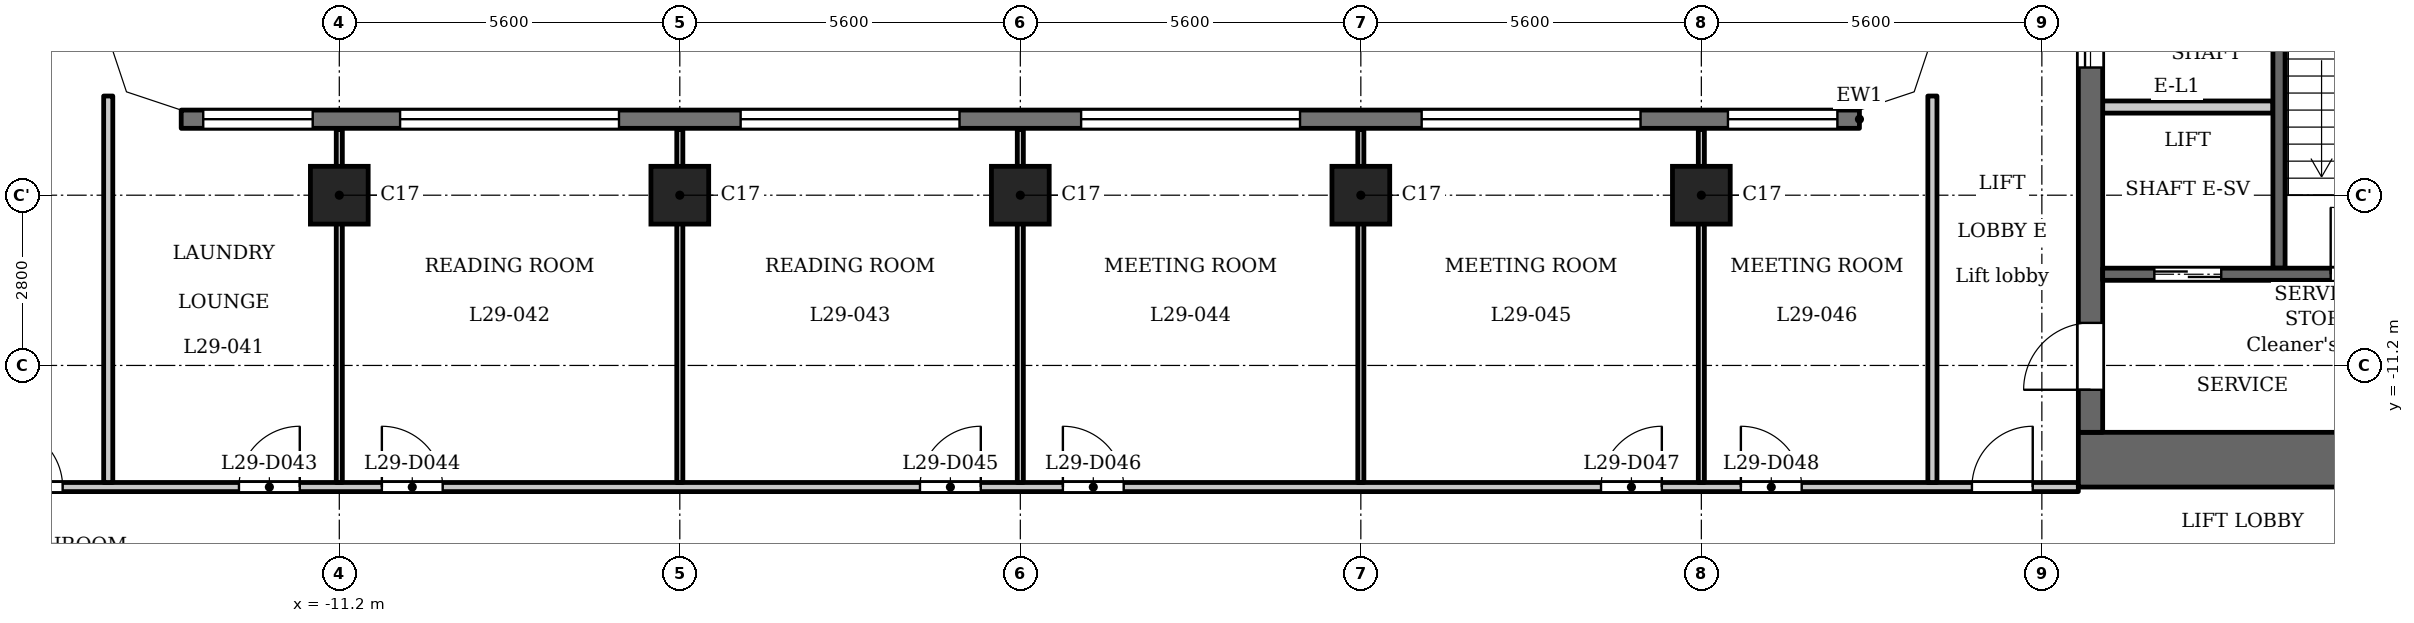
"""IFC4 building model, lengths in metres.
Left out: names, types, materials, properties, quantities, classifications, styles, units other than length and angle.
Written with IfcOpenShell. Run it as: python <this file> out.ifc"""

import sys

from ifc_helpers import new_model, si_unit, direction, frame, frame_2d, origin, origin_2d, place, context, subcontext, project, spatial, polyline, rectangle, outline, extrude, element, fill, save


model = new_model("IFC4")
c1 = context("Model", 3, precision=1e-05, world=origin(), true_north=direction((0.0, 1.0)))
c2 = subcontext(c1, "Body", "Model", "MODEL_VIEW")
j1 = project(units=[si_unit("LENGTHUNIT", "METRE"), si_unit("PLANEANGLEUNIT", "RADIAN")], contexts=[c1])
p1 = place(None, origin())
s1 = spatial("IfcSite", under=j1, at=p1, CompositionType="ELEMENT")
p2 = place(p1, origin())
s2 = spatial("IfcBuilding", under=s1, at=p2, CompositionType="ELEMENT")
p3 = place(p2, frame((0.0, 0.0, 114.8)))
s3 = spatial("IfcBuildingStorey", under=s2, at=p3, CompositionType="ELEMENT", Elevation=114.8)
for number, where, z_axis, x_axis in (
    (1, (-11.2, -8.4, 0.0), (0.0, 0.0, 1.0), (1.0, 0.0, 0.0)),
    (2, (-5.6, -8.4, 0.0), (0.0, 0.0, 1.0), (1.0, 0.0, 0.0)),
    (3, (0.0, -8.4, 0.0), (0.0, 0.0, 1.0), (1.0, 0.0, 0.0)),
    (4, (5.6, -8.4, 0.0), (0.0, 0.0, 1.0), (1.0, 0.0, 0.0)),
    (5, (11.2, -8.4, 0.0), (0.0, 0.0, 1.0), (1.0, 0.0, 0.0)),
):
    element("IfcColumn", number, at=place(p3, frame(where, z_axis=z_axis, x_axis=x_axis)), inside=s3, PredefinedType="COLUMN", context=c2, shape_type="SweptSolid", body=[
        extrude(rectangle(XDim=0.95, YDim=0.95, at=origin_2d()), origin(), (0.0, 0.0, 1.0), 3.5),
    ])
p4 = place(p3, frame((13.8, -7.15, 0.0), z_axis=(0.0, 0.0, 1.0), x_axis=(-1.0, 0.0, 0.0)))
e6 = element("IfcWall", 6, at=p4, inside=s3, PredefinedType="SOLIDWALL", context=c2, shape_type="SweptSolid", body=[
    extrude(rectangle(XDim=27.6, YDim=0.3, at=frame_2d((13.8, 0.0))), origin(), (0.0, 0.0, 1.0), 3.2),
])
p5 = place(p4, frame((0.363, 0.0, 0.9)))
e7 = element("IfcOpeningElement", 7, at=p5, cuts=e6, PredefinedType="OPENING", context=c2, shape_type="SweptSolid", body=[
    extrude(rectangle(XDim=1.8, YDim=1.25, at=frame_2d((0.9, 0.625))), frame((0.0, 0.16, 0.0), z_axis=(0.0, -1.0, 0.0), x_axis=(1.0, 0.0, 0.0)), (0.0, 0.0, 1.0), 0.32),
])
p6 = place(p4, frame((3.6, 0.0, 1.2)))
e8 = element("IfcOpeningElement", 8, at=p6, cuts=e6, PredefinedType="OPENING", context=c2, shape_type="SweptSolid", body=[
    extrude(rectangle(XDim=3.6, YDim=0.95, at=frame_2d((1.8, 0.475))), frame((0.0, 0.16, 0.0), z_axis=(0.0, -1.0, 0.0), x_axis=(1.0, 0.0, 0.0)), (0.0, 0.0, 1.0), 0.32),
])
p7 = place(p4, frame((9.2, 0.0, 1.2)))
e9 = element("IfcOpeningElement", 9, at=p7, cuts=e6, PredefinedType="OPENING", context=c2, shape_type="SweptSolid", body=[
    extrude(rectangle(XDim=3.6, YDim=0.95, at=frame_2d((1.8, 0.475))), frame((0.0, 0.16, 0.0), z_axis=(0.0, -1.0, 0.0), x_axis=(1.0, 0.0, 0.0)), (0.0, 0.0, 1.0), 0.32),
])
p8 = place(p4, frame((14.8, 0.0, 1.2)))
e10 = element("IfcOpeningElement", 10, at=p8, cuts=e6, PredefinedType="OPENING", context=c2, shape_type="SweptSolid", body=[
    extrude(rectangle(XDim=3.6, YDim=0.95, at=frame_2d((1.8, 0.475))), frame((0.0, 0.16, 0.0), z_axis=(0.0, -1.0, 0.0), x_axis=(1.0, 0.0, 0.0)), (0.0, 0.0, 1.0), 0.32),
])
p9 = place(p4, frame((20.4, 0.0, 1.2)))
e11 = element("IfcOpeningElement", 11, at=p9, cuts=e6, PredefinedType="OPENING", context=c2, shape_type="SweptSolid", body=[
    extrude(rectangle(XDim=3.6, YDim=0.95, at=frame_2d((1.8, 0.475))), frame((0.0, 0.16, 0.0), z_axis=(0.0, -1.0, 0.0), x_axis=(1.0, 0.0, 0.0)), (0.0, 0.0, 1.0), 0.32),
])
p10 = place(p4, frame((25.438, 0.0, 0.9)))
e12 = element("IfcOpeningElement", 12, at=p10, cuts=e6, PredefinedType="OPENING", context=c2, shape_type="SweptSolid", body=[
    extrude(rectangle(XDim=1.8, YDim=1.25, at=frame_2d((0.9, 0.625))), frame((0.0, 0.16, 0.0), z_axis=(0.0, -1.0, 0.0), x_axis=(1.0, 0.0, 0.0)), (0.0, 0.0, 1.0), 0.32),
])
p11 = place(p3, frame((20.7, -9.6, 0.0), z_axis=(0.0, 0.0, 1.0), x_axis=(0.0, 1.0, 0.0)))
e13 = element("IfcWall", 13, at=p11, inside=s3, PredefinedType="SHEAR", context=c2, shape_type="SweptSolid", body=[
    extrude(rectangle(XDim=9.75, YDim=0.2, at=frame_2d((4.875, 0.0))), origin(), (0.0, 0.0, 1.0), 3.2),
])
p12 = place(p3, frame((17.4, -12.75, 0.0), z_axis=(0.0, 0.0, 1.0), x_axis=(1.0, 0.0, 0.0)))
e14 = element("IfcWall", 14, at=p12, inside=s3, PredefinedType="SHEAR", context=c2, shape_type="SweptSolid", body=[
    extrude(rectangle(XDim=10.4, YDim=0.9, at=frame_2d((5.2, 0.0))), origin(), (0.0, 0.0, 1.0), 3.2),
])
p13 = place(p3, frame((17.6, -12.3, 0.0), z_axis=(0.0, 0.0, 1.0), x_axis=(0.0, 1.0, 0.0)))
e15 = element("IfcWall", 15, at=p13, inside=s3, PredefinedType="SHEAR", context=c2, shape_type="SweptSolid", body=[
    extrude(rectangle(XDim=24.6, YDim=0.4, at=frame_2d((12.3, 0.0))), origin(), (0.0, 0.0, 1.0), 3.2),
])
p14 = place(p13, frame((6.0, 0.0, 0.0)))
e16 = element("IfcOpeningElement", 16, at=p14, cuts=e15, PredefinedType="OPENING", context=c2, shape_type="SweptSolid", body=[
    extrude(rectangle(XDim=1.1, YDim=2.1, at=frame_2d((0.55, 1.05))), frame((0.0, 0.21, 0.0), z_axis=(0.0, -1.0, 0.0), x_axis=(1.0, 0.0, 0.0)), (0.0, 0.0, 1.0), 0.42),
])
p15 = place(p13, frame((8.4, 0.0, 0.0)))
e17 = element("IfcOpeningElement", 17, at=p15, cuts=e15, PredefinedType="OPENING", context=c2, shape_type="SweptSolid", body=[
    extrude(rectangle(XDim=1.1, YDim=2.1, at=frame_2d((0.55, 1.05))), frame((0.0, 0.21, 0.0), z_axis=(0.0, -1.0, 0.0), x_axis=(1.0, 0.0, 0.0)), (0.0, 0.0, 1.0), 0.42),
])
p16 = place(p13, frame((10.8, 0.0, 0.0)))
e18 = element("IfcOpeningElement", 18, at=p16, cuts=e15, PredefinedType="OPENING", context=c2, shape_type="SweptSolid", body=[
    extrude(rectangle(XDim=1.1, YDim=2.1, at=frame_2d((0.55, 1.05))), frame((0.0, 0.21, 0.0), z_axis=(0.0, -1.0, 0.0), x_axis=(1.0, 0.0, 0.0)), (0.0, 0.0, 1.0), 0.42),
])
p17 = place(p13, frame((16.75, 0.0, 0.0)))
e19 = element("IfcOpeningElement", 19, at=p17, cuts=e15, PredefinedType="OPENING", context=c2, shape_type="SweptSolid", body=[
    extrude(rectangle(XDim=0.9, YDim=2.1, at=frame_2d((0.45, 1.05))), frame((0.0, 0.21, 0.0), z_axis=(0.0, -1.0, 0.0), x_axis=(1.0, 0.0, 0.0)), (0.0, 0.0, 1.0), 0.42),
])
p18 = place(p13, frame((22.8, 0.0, 0.0)))
e20 = element("IfcOpeningElement", 20, at=p18, cuts=e15, PredefinedType="OPENING", context=c2, shape_type="SweptSolid", body=[
    extrude(rectangle(XDim=1.1, YDim=2.1, at=frame_2d((0.55, 1.05))), frame((0.0, 0.21, 0.0), z_axis=(0.0, -1.0, 0.0), x_axis=(1.0, 0.0, 0.0)), (0.0, 0.0, 1.0), 0.42),
])
p19 = place(p13, frame((0.7, 0.0, 0.0)))
e21 = element("IfcOpeningElement", 21, at=p19, cuts=e15, PredefinedType="OPENING", context=c2, shape_type="SweptSolid", body=[
    extrude(rectangle(XDim=1.1, YDim=2.1, at=frame_2d((0.55, 1.05))), frame((0.0, 0.21, 0.0), z_axis=(0.0, -1.0, 0.0), x_axis=(1.0, 0.0, 0.0)), (0.0, 0.0, 1.0), 0.42),
])
p20 = place(p13, frame((12.775, 0.0, 0.0)))
e22 = element("IfcOpeningElement", 22, at=p20, cuts=e15, PredefinedType="OPENING", context=c2, shape_type="SweptSolid", body=[
    extrude(rectangle(XDim=1.8, YDim=2.1, at=frame_2d((0.9, 1.05))), frame((0.0, 0.21, 0.0), z_axis=(0.0, -1.0, 0.0), x_axis=(1.0, 0.0, 0.0)), (0.0, 0.0, 1.0), 0.42),
])
p21 = place(p3, frame((17.8, -9.7, 0.0), z_axis=(0.0, 0.0, 1.0), x_axis=(1.0, 0.0, 0.0)))
e23 = element("IfcWall", 23, at=p21, inside=s3, PredefinedType="SHEAR", context=c2, shape_type="SweptSolid", body=[
    extrude(rectangle(XDim=8.3, YDim=0.2, at=frame_2d((4.15, 0.0))), origin(), (0.0, 0.0, 1.0), 3.2),
])
p22 = place(p21, frame((0.85, 0.0, 0.0)))
e24 = element("IfcOpeningElement", 24, at=p22, cuts=e23, PredefinedType="OPENING", context=c2, shape_type="SweptSolid", body=[
    extrude(rectangle(XDim=1.1, YDim=2.1, at=frame_2d((0.55, 1.05))), frame((0.0, 0.11, 0.0), z_axis=(0.0, -1.0, 0.0), x_axis=(1.0, 0.0, 0.0)), (0.0, 0.0, 1.0), 0.22),
])
p23 = place(p21, frame((3.75, 0.0, 0.0)))
e25 = element("IfcOpeningElement", 25, at=p23, cuts=e23, PredefinedType="OPENING", context=c2, shape_type="SweptSolid", body=[
    extrude(rectangle(XDim=1.1, YDim=2.1, at=frame_2d((0.55, 1.05))), frame((0.0, 0.11, 0.0), z_axis=(0.0, -1.0, 0.0), x_axis=(1.0, 0.0, 0.0)), (0.0, 0.0, 1.0), 0.22),
])
p24 = place(p3, frame((17.8, -6.95, 0.0), z_axis=(0.0, 0.0, 1.0), x_axis=(1.0, 0.0, 0.0)))
e26 = element("IfcWall", 26, at=p24, inside=s3, PredefinedType="PARTITIONING", context=c2, shape_type="SweptSolid", body=[
    extrude(rectangle(XDim=2.8, YDim=0.2, at=frame_2d((1.4, 0.0))), origin(), (0.0, 0.0, 1.0), 3.2),
])
p25 = place(p3, frame((-17.4, -13.2, 0.0), z_axis=(0.0, 0.0, 1.0), x_axis=(1.0, 0.0, 0.0)))
e27 = element("IfcWall", 27, at=p25, inside=s3, PredefinedType="PARTITIONING", context=c2, shape_type="SweptSolid", body=[
    extrude(rectangle(XDim=34.8, YDim=0.15, at=frame_2d((17.4, 0.0))), origin(), (0.0, 0.0, 1.0), 3.2),
])
p26 = place(p25, frame((0.65, 0.0, 0.0)))
e28 = element("IfcOpeningElement", 28, at=p26, cuts=e27, PredefinedType="OPENING", context=c2, shape_type="SweptSolid", body=[
    extrude(rectangle(XDim=1.0, YDim=2.1, at=frame_2d((0.5, 1.05))), frame((0.0, 0.085, 0.0), z_axis=(0.0, -1.0, 0.0), x_axis=(1.0, 0.0, 0.0)), (0.0, 0.0, 1.0), 0.17),
])
p27 = place(p25, frame((33.05, 0.0, 0.0)))
e29 = element("IfcOpeningElement", 29, at=p27, cuts=e27, PredefinedType="OPENING", context=c2, shape_type="SweptSolid", body=[
    extrude(rectangle(XDim=1.0, YDim=2.1, at=frame_2d((0.5, 1.05))), frame((0.0, 0.085, 0.0), z_axis=(0.0, -1.0, 0.0), x_axis=(1.0, 0.0, 0.0)), (0.0, 0.0, 1.0), 0.17),
])
p28 = place(p25, frame((4.55, 0.0, 0.0)))
e30 = element("IfcOpeningElement", 30, at=p28, cuts=e27, PredefinedType="OPENING", context=c2, shape_type="SweptSolid", body=[
    extrude(rectangle(XDim=1.0, YDim=2.1, at=frame_2d((0.5, 1.05))), frame((0.0, 0.085, 0.0), z_axis=(0.0, -1.0, 0.0), x_axis=(1.0, 0.0, 0.0)), (0.0, 0.0, 1.0), 0.17),
])
p29 = place(p25, frame((6.9, 0.0, 0.0)))
e31 = element("IfcOpeningElement", 31, at=p29, cuts=e27, PredefinedType="OPENING", context=c2, shape_type="SweptSolid", body=[
    extrude(rectangle(XDim=1.0, YDim=2.1, at=frame_2d((0.5, 1.05))), frame((0.0, 0.085, 0.0), z_axis=(0.0, -1.0, 0.0), x_axis=(1.0, 0.0, 0.0)), (0.0, 0.0, 1.0), 0.17),
])
p30 = place(p25, frame((15.75, 0.0, 0.0)))
e32 = element("IfcOpeningElement", 32, at=p30, cuts=e27, PredefinedType="OPENING", context=c2, shape_type="SweptSolid", body=[
    extrude(rectangle(XDim=1.0, YDim=2.1, at=frame_2d((0.5, 1.05))), frame((0.0, 0.085, 0.0), z_axis=(0.0, -1.0, 0.0), x_axis=(1.0, 0.0, 0.0)), (0.0, 0.0, 1.0), 0.17),
])
p31 = place(p25, frame((18.1, 0.0, 0.0)))
e33 = element("IfcOpeningElement", 33, at=p31, cuts=e27, PredefinedType="OPENING", context=c2, shape_type="SweptSolid", body=[
    extrude(rectangle(XDim=1.0, YDim=2.1, at=frame_2d((0.5, 1.05))), frame((0.0, 0.085, 0.0), z_axis=(0.0, -1.0, 0.0), x_axis=(1.0, 0.0, 0.0)), (0.0, 0.0, 1.0), 0.17),
])
p32 = place(p25, frame((26.95, 0.0, 0.0)))
e34 = element("IfcOpeningElement", 34, at=p32, cuts=e27, PredefinedType="OPENING", context=c2, shape_type="SweptSolid", body=[
    extrude(rectangle(XDim=1.0, YDim=2.1, at=frame_2d((0.5, 1.05))), frame((0.0, 0.085, 0.0), z_axis=(0.0, -1.0, 0.0), x_axis=(1.0, 0.0, 0.0)), (0.0, 0.0, 1.0), 0.17),
])
p33 = place(p25, frame((29.25, 0.0, 0.0)))
e35 = element("IfcOpeningElement", 35, at=p33, cuts=e27, PredefinedType="OPENING", context=c2, shape_type="SweptSolid", body=[
    extrude(rectangle(XDim=1.0, YDim=2.1, at=frame_2d((0.5, 1.05))), frame((0.0, 0.085, 0.0), z_axis=(0.0, -1.0, 0.0), x_axis=(1.0, 0.0, 0.0)), (0.0, 0.0, 1.0), 0.17),
])
p34 = place(p3, frame((-15.0, -13.125, 0.0), z_axis=(0.0, 0.0, 1.0), x_axis=(0.0, 1.0, 0.0)))
e36 = element("IfcWall", 36, at=p34, inside=s3, PredefinedType="PARTITIONING", context=c2, shape_type="SweptSolid", body=[
    extrude(rectangle(XDim=6.356, YDim=0.15, at=frame_2d((3.178, 0.0))), origin(), (0.0, 0.0, 1.0), 3.2),
])
for number, where, z_axis, x_axis in (
    (37, (-11.2, -13.125, 0.0), (0.0, 0.0, 1.0), (0.0, 1.0, 0.0)),
    (38, (-5.6, -13.125, 0.0), (0.0, 0.0, 1.0), (0.0, 1.0, 0.0)),
    (39, (0.0, -13.125, 0.0), (0.0, 0.0, 1.0), (0.0, 1.0, 0.0)),
    (40, (5.6, -13.125, 0.0), (0.0, 0.0, 1.0), (0.0, 1.0, 0.0)),
    (41, (11.2, -13.125, 0.0), (0.0, 0.0, 1.0), (0.0, 1.0, 0.0)),
):
    element("IfcWall", number, at=place(p3, frame(where, z_axis=z_axis, x_axis=x_axis)), inside=s3, PredefinedType="PARTITIONING", context=c2, shape_type="SweptSolid", body=[
        extrude(rectangle(XDim=5.805, YDim=0.1, at=frame_2d((2.902, 0.0))), origin(), (0.0, 0.0, 1.0), 3.2),
    ])
p35 = place(p3, frame((15.0, -13.125, 0.0), z_axis=(0.0, 0.0, 1.0), x_axis=(0.0, 1.0, 0.0)))
e42 = element("IfcWall", 42, at=p35, inside=s3, PredefinedType="PARTITIONING", context=c2, shape_type="SweptSolid", body=[
    extrude(rectangle(XDim=6.356, YDim=0.15, at=frame_2d((3.178, 0.0))), origin(), (0.0, 0.0, 1.0), 3.2),
])
p36 = place(p3, origin())
e43 = element("IfcWall", 43, at=p36, inside=s3, PredefinedType="SOLIDWALL", context=c2, shape_type="SweptSolid", body=[
    extrude(outline(polyline([(14.937, -6.937), (15.3, -5.849), (15.3, -5.8), (15.0, -5.8), (14.7, -6.7), (13.8, -7.0), (13.8, -7.3), (13.849, -7.3), (14.937, -6.937)])), origin(), (0.0, 0.0, 1.0), 3.2),
])
e44 = element("IfcWall", 44, at=p36, inside=s3, PredefinedType="SOLIDWALL", context=c2, shape_type="SweptSolid", body=[
    extrude(outline(polyline([(-14.937, -6.937), (-13.849, -7.3), (-13.8, -7.3), (-13.8, -7.0), (-14.7, -6.7), (-15.0, -5.8), (-15.3, -5.8), (-15.3, -5.849), (-14.937, -6.937)])), origin(), (0.0, 0.0, 1.0), 3.2),
])
p37 = place(p22, origin())
e45 = element("IfcDoor", 45, at=p37, inside=s3, OperationType="DOUBLE_DOOR_SLIDING", PredefinedType="DOOR", context=c2, shape_type="SweptSolid", body=[
    extrude(rectangle(XDim=1.1, YDim=2.1, at=frame_2d((0.55, 1.05))), frame((0.0, 0.025, 0.0), z_axis=(0.0, -1.0, 0.0), x_axis=(1.0, 0.0, 0.0)), (0.0, 0.0, 1.0), 0.05),
])
fill(e24, e45)
p38 = place(p14, origin())
e46 = element("IfcDoor", 46, at=p38, inside=s3, OperationType="DOUBLE_DOOR_SLIDING", PredefinedType="DOOR", context=c2, shape_type="SweptSolid", body=[
    extrude(rectangle(XDim=1.1, YDim=2.1, at=frame_2d((0.55, 1.05))), frame((0.0, 0.025, 0.0), z_axis=(0.0, -1.0, 0.0), x_axis=(1.0, 0.0, 0.0)), (0.0, 0.0, 1.0), 0.05),
])
fill(e16, e46)
p39 = place(p19, origin())
e47 = element("IfcDoor", 47, at=p39, inside=s3, OperationType="SINGLE_SWING_RIGHT", PredefinedType="DOOR", context=c2, shape_type="SweptSolid", body=[
    extrude(rectangle(XDim=1.1, YDim=2.1, at=frame_2d((0.55, 1.05))), frame((0.0, 0.025, 0.0), z_axis=(0.0, -1.0, 0.0), x_axis=(1.0, 0.0, 0.0)), (0.0, 0.0, 1.0), 0.05),
])
fill(e21, e47)
p40 = place(p23, origin())
e48 = element("IfcDoor", 48, at=p40, inside=s3, OperationType="SINGLE_SWING_RIGHT", PredefinedType="DOOR", context=c2, shape_type="SweptSolid", body=[
    extrude(rectangle(XDim=1.1, YDim=2.1, at=frame_2d((0.55, 1.05))), frame((0.0, 0.025, 0.0), z_axis=(0.0, -1.0, 0.0), x_axis=(1.0, 0.0, 0.0)), (0.0, 0.0, 1.0), 0.05),
])
fill(e25, e48)
p41 = place(p26, origin())
e49 = element("IfcDoor", 49, at=p41, inside=s3, OperationType="SINGLE_SWING_RIGHT", PredefinedType="DOOR", context=c2, shape_type="SweptSolid", body=[
    extrude(rectangle(XDim=1.0, YDim=2.1, at=frame_2d((0.5, 1.05))), frame((0.0, 0.025, 0.0), z_axis=(0.0, -1.0, 0.0), x_axis=(1.0, 0.0, 0.0)), (0.0, 0.0, 1.0), 0.05),
])
fill(e28, e49)
p42 = place(p27, origin())
e50 = element("IfcDoor", 50, at=p42, inside=s3, OperationType="SINGLE_SWING_LEFT", PredefinedType="DOOR", context=c2, shape_type="SweptSolid", body=[
    extrude(rectangle(XDim=1.0, YDim=2.1, at=frame_2d((0.5, 1.05))), frame((0.0, 0.025, 0.0), z_axis=(0.0, -1.0, 0.0), x_axis=(1.0, 0.0, 0.0)), (0.0, 0.0, 1.0), 0.05),
])
fill(e29, e50)
p43 = place(p28, origin())
e51 = element("IfcDoor", 51, at=p43, inside=s3, OperationType="SINGLE_SWING_LEFT", PredefinedType="DOOR", context=c2, shape_type="SweptSolid", body=[
    extrude(rectangle(XDim=1.0, YDim=2.1, at=frame_2d((0.5, 1.05))), frame((0.0, 0.025, 0.0), z_axis=(0.0, -1.0, 0.0), x_axis=(1.0, 0.0, 0.0)), (0.0, 0.0, 1.0), 0.05),
])
fill(e30, e51)
p44 = place(p29, origin())
e52 = element("IfcDoor", 52, at=p44, inside=s3, OperationType="SINGLE_SWING_RIGHT", PredefinedType="DOOR", context=c2, shape_type="SweptSolid", body=[
    extrude(rectangle(XDim=1.0, YDim=2.1, at=frame_2d((0.5, 1.05))), frame((0.0, 0.025, 0.0), z_axis=(0.0, -1.0, 0.0), x_axis=(1.0, 0.0, 0.0)), (0.0, 0.0, 1.0), 0.05),
])
fill(e31, e52)
p45 = place(p30, origin())
e53 = element("IfcDoor", 53, at=p45, inside=s3, OperationType="SINGLE_SWING_LEFT", PredefinedType="DOOR", context=c2, shape_type="SweptSolid", body=[
    extrude(rectangle(XDim=1.0, YDim=2.1, at=frame_2d((0.5, 1.05))), frame((0.0, 0.025, 0.0), z_axis=(0.0, -1.0, 0.0), x_axis=(1.0, 0.0, 0.0)), (0.0, 0.0, 1.0), 0.05),
])
fill(e32, e53)
p46 = place(p31, origin())
e54 = element("IfcDoor", 54, at=p46, inside=s3, OperationType="SINGLE_SWING_RIGHT", PredefinedType="DOOR", context=c2, shape_type="SweptSolid", body=[
    extrude(rectangle(XDim=1.0, YDim=2.1, at=frame_2d((0.5, 1.05))), frame((0.0, 0.025, 0.0), z_axis=(0.0, -1.0, 0.0), x_axis=(1.0, 0.0, 0.0)), (0.0, 0.0, 1.0), 0.05),
])
fill(e33, e54)
p47 = place(p32, origin())
e55 = element("IfcDoor", 55, at=p47, inside=s3, OperationType="SINGLE_SWING_LEFT", PredefinedType="DOOR", context=c2, shape_type="SweptSolid", body=[
    extrude(rectangle(XDim=1.0, YDim=2.1, at=frame_2d((0.5, 1.05))), frame((0.0, 0.025, 0.0), z_axis=(0.0, -1.0, 0.0), x_axis=(1.0, 0.0, 0.0)), (0.0, 0.0, 1.0), 0.05),
])
fill(e34, e55)
p48 = place(p33, origin())
e56 = element("IfcDoor", 56, at=p48, inside=s3, OperationType="SINGLE_SWING_RIGHT", PredefinedType="DOOR", context=c2, shape_type="SweptSolid", body=[
    extrude(rectangle(XDim=1.0, YDim=2.1, at=frame_2d((0.5, 1.05))), frame((0.0, 0.025, 0.0), z_axis=(0.0, -1.0, 0.0), x_axis=(1.0, 0.0, 0.0)), (0.0, 0.0, 1.0), 0.05),
])
fill(e35, e56)
p49 = place(p5, origin())
e57 = element("IfcWindow", 57, at=p49, inside=s3, PartitioningType="SINGLE_PANEL", PredefinedType="WINDOW", context=c2, shape_type="SweptSolid", body=[
    extrude(rectangle(XDim=1.8, YDim=1.25, at=frame_2d((0.9, 0.625))), frame((0.0, 0.03, 0.0), z_axis=(0.0, -1.0, 0.0), x_axis=(1.0, 0.0, 0.0)), (0.0, 0.0, 1.0), 0.06),
])
fill(e7, e57)
p50 = place(p6, origin())
e58 = element("IfcWindow", 58, at=p50, inside=s3, PartitioningType="SINGLE_PANEL", PredefinedType="WINDOW", context=c2, shape_type="SweptSolid", body=[
    extrude(rectangle(XDim=3.6, YDim=0.95, at=frame_2d((1.8, 0.475))), frame((0.0, 0.03, 0.0), z_axis=(0.0, -1.0, 0.0), x_axis=(1.0, 0.0, 0.0)), (0.0, 0.0, 1.0), 0.06),
])
fill(e8, e58)
p51 = place(p7, origin())
e59 = element("IfcWindow", 59, at=p51, inside=s3, PartitioningType="SINGLE_PANEL", PredefinedType="WINDOW", context=c2, shape_type="SweptSolid", body=[
    extrude(rectangle(XDim=3.6, YDim=0.95, at=frame_2d((1.8, 0.475))), frame((0.0, 0.03, 0.0), z_axis=(0.0, -1.0, 0.0), x_axis=(1.0, 0.0, 0.0)), (0.0, 0.0, 1.0), 0.06),
])
fill(e9, e59)
p52 = place(p8, origin())
e60 = element("IfcWindow", 60, at=p52, inside=s3, PartitioningType="SINGLE_PANEL", PredefinedType="WINDOW", context=c2, shape_type="SweptSolid", body=[
    extrude(rectangle(XDim=3.6, YDim=0.95, at=frame_2d((1.8, 0.475))), frame((0.0, 0.03, 0.0), z_axis=(0.0, -1.0, 0.0), x_axis=(1.0, 0.0, 0.0)), (0.0, 0.0, 1.0), 0.06),
])
fill(e10, e60)
p53 = place(p9, origin())
e61 = element("IfcWindow", 61, at=p53, inside=s3, PartitioningType="SINGLE_PANEL", PredefinedType="WINDOW", context=c2, shape_type="SweptSolid", body=[
    extrude(rectangle(XDim=3.6, YDim=0.95, at=frame_2d((1.8, 0.475))), frame((0.0, 0.03, 0.0), z_axis=(0.0, -1.0, 0.0), x_axis=(1.0, 0.0, 0.0)), (0.0, 0.0, 1.0), 0.06),
])
fill(e11, e61)
p54 = place(p10, origin())
e62 = element("IfcWindow", 62, at=p54, inside=s3, PartitioningType="SINGLE_PANEL", PredefinedType="WINDOW", context=c2, shape_type="SweptSolid", body=[
    extrude(rectangle(XDim=1.8, YDim=1.25, at=frame_2d((0.9, 0.625))), frame((0.0, 0.03, 0.0), z_axis=(0.0, -1.0, 0.0), x_axis=(1.0, 0.0, 0.0)), (0.0, 0.0, 1.0), 0.06),
])
fill(e12, e62)
save(model, sys.argv[1])
